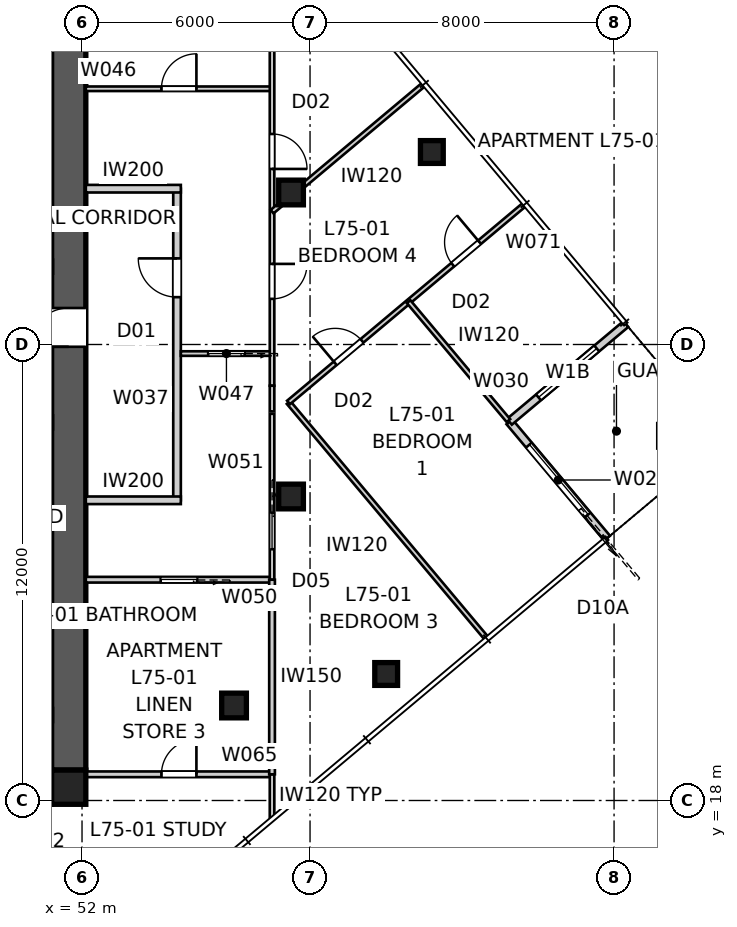
"""IFC4 building model, lengths in metres.
Left out: names, types, materials, properties, quantities, classifications, styles, units other than length and angle.
Written with IfcOpenShell. Run it as: python <this file> out.ifc"""

import sys

from ifc_helpers import new_model, si_unit, direction, frame, frame_2d, origin, origin_2d, place, context, subcontext, project, spatial, polyline, rectangle, outline, extrude, element, fill, save


model = new_model("IFC4")
c1 = context("Model", 3, precision=1e-05, world=origin(), true_north=direction((0.0, 1.0)))
c2 = subcontext(c1, "Body", "Model", "MODEL_VIEW")
j1 = project(units=[si_unit("LENGTHUNIT", "METRE"), si_unit("PLANEANGLEUNIT", "RADIAN")], contexts=[c1])
p1 = place(None, origin())
s1 = spatial("IfcSite", under=j1, at=p1, CompositionType="ELEMENT")
p2 = place(p1, origin())
s2 = spatial("IfcBuilding", under=s1, at=p2, CompositionType="ELEMENT")
p3 = place(p2, frame((0.0, 0.0, 272.6)))
s3 = spatial("IfcBuildingStorey", under=s2, at=p3, CompositionType="ELEMENT", Elevation=272.6)
p4 = place(p3, frame((51.2, 18.35, 0.0), z_axis=(0.0, 0.0, 1.0), x_axis=(-1.0, 0.0, 0.0)))
e1 = element("IfcWall", 1, at=p4, inside=s3, PredefinedType="SHEAR", context=c2, shape_type="SweptSolid", body=[
    extrude(outline(polyline([(0.0, -0.45), (22.4, -0.45), (22.4, -0.025), (22.85, -0.025), (22.85, 0.025), (22.4, 0.025), (22.4, 0.45), (0.0, 0.45), (0.0, 0.025), (-0.45, 0.025), (-0.45, -0.025), (0.0, -0.025), (0.0, -0.45)])), origin(), (0.0, 0.0, 1.0), 3.4),
])
p5 = place(p3, frame((51.65, 18.8, 0.0), z_axis=(0.0, 0.0, 1.0), x_axis=(0.0, 1.0, 0.0)))
e2 = element("IfcWall", 2, at=p5, inside=s3, PredefinedType="SHEAR", context=c2, shape_type="SweptSolid", body=[
    extrude(outline(polyline([(0.0, -0.45), (22.4, -0.45), (22.4, -0.025), (22.85, -0.025), (22.85, 0.025), (22.4, 0.025), (22.4, 0.45), (0.0, 0.45), (0.0, 0.025), (-0.45, 0.025), (-0.45, -0.025), (0.0, -0.025), (0.0, -0.45)])), origin(), (0.0, 0.0, 1.0), 3.4),
])
p6 = place(p5, frame((11.14, 0.0, 0.0)))
e3 = element("IfcOpeningElement", 3, at=p6, cuts=e2, PredefinedType="OPENING", context=c2, shape_type="SweptSolid", body=[
    extrude(rectangle(XDim=1.02, YDim=2.4, at=frame_2d((0.51, 1.2))), frame((0.0, 0.46, 0.0), z_axis=(0.0, -1.0, 0.0), x_axis=(1.0, 0.0, 0.0)), (0.0, 0.0, 1.0), 0.92),
])
p7 = place(p3, frame((51.65, 18.35, 0.0), z_axis=(0.0, 0.0, 1.0), x_axis=(1.0, 0.0, 0.0)))
e4 = element("IfcColumn", 4, at=p7, inside=s3, PredefinedType="COLUMN", context=c2, shape_type="SweptSolid", body=[
    extrude(rectangle(XDim=0.9, YDim=0.9, at=origin_2d()), origin(), (0.0, 0.0, 1.0), 3.4),
])
for number, where, z_axis, x_axis in (
    (5, (60.003, 21.329, -0.15), (0.0, 0.0, 1.0), (1.0, 0.0, 0.0)),
    (6, (61.205, 35.065, -0.15), (0.0, 0.0, 1.0), (1.0, 0.0, 0.0)),
):
    element("IfcColumn", number, at=place(p3, frame(where, z_axis=z_axis, x_axis=x_axis)), inside=s3, PredefinedType="COLUMN", context=c2, shape_type="SweptSolid", body=[
        extrude(rectangle(XDim=0.6, YDim=0.6, at=origin_2d()), origin(), (0.0, 0.0, 1.0), 3.55),
    ])
for number, where, z_axis, x_axis in (
    (7, (57.5, 26.0, 0.0), (0.0, 0.0, 1.0), (1.0, 0.0, 0.0)),
    (8, (57.5, 34.0, 0.0), (0.0, 0.0, 1.0), (1.0, 0.0, 0.0)),
    (9, (56.0, 20.5, 0.0), (0.0, 0.0, 1.0), (1.0, 0.0, 0.0)),
):
    element("IfcColumn", number, at=place(p3, frame(where, z_axis=z_axis, x_axis=x_axis)), inside=s3, PredefinedType="COLUMN", context=c2, shape_type="SweptSolid", body=[
        extrude(rectangle(XDim=0.65, YDim=0.65, at=origin_2d()), origin(), (0.0, 0.0, 1.0), 3.4),
    ])
p8 = place(p3, frame((65.817, 24.902, 0.0), z_axis=(0.0, 0.0, 1.0), x_axis=(-0.642768287094, 0.766060656284, 0.0)))
e10 = element("IfcWall", 10, at=p8, inside=s3, PredefinedType="SOLIDWALL", context=c2, shape_type="SweptSolid", body=[
    extrude(rectangle(XDim=4.0, YDim=0.2, at=frame_2d((2.0, 0.0))), origin(), (0.0, 0.0, 1.0), 3.25),
])
p9 = place(p8, frame((0.8, 0.0, 0.0)))
e11 = element("IfcOpeningElement", 11, at=p9, cuts=e10, PredefinedType="OPENING", context=c2, shape_type="SweptSolid", body=[
    extrude(rectangle(XDim=2.4, YDim=2.1, at=frame_2d((1.2, 1.05))), frame((0.0, 0.11, 0.0), z_axis=(0.0, -1.0, 0.0), x_axis=(1.0, 0.0, 0.0)), (0.0, 0.0, 1.0), 0.22),
])
p10 = place(p3, frame((63.246, 27.966, 0.0), z_axis=(0.0, 0.0, 1.0), x_axis=(0.766035437498, 0.642798342015, 0.0)))
e12 = element("IfcWall", 12, at=p10, inside=s3, PredefinedType="SOLIDWALL", context=c2, shape_type="SweptSolid", body=[
    extrude(rectangle(XDim=4.0, YDim=0.2, at=frame_2d((2.0, 0.0))), origin(), (0.0, 0.0, 1.0), 3.25),
])
p11 = place(p10, frame((1.0, 0.0, 0.45)))
e13 = element("IfcOpeningElement", 13, at=p11, cuts=e12, PredefinedType="OPENING", context=c2, shape_type="SweptSolid", body=[
    extrude(rectangle(XDim=2.0, YDim=1.8, at=frame_2d((1.0, 0.9))), frame((0.0, 0.11, 0.0), z_axis=(0.0, -1.0, 0.0), x_axis=(1.0, 0.0, 0.0)), (0.0, 0.0, 1.0), 0.22),
])
p12 = place(p3, frame((54.5, 25.9, 0.0), z_axis=(0.0, 0.0, 1.0), x_axis=(0.0, 1.0, 0.0)))
e14 = element("IfcWall", 14, at=p12, inside=s3, PredefinedType="PARTITIONING", context=c2, shape_type="SweptSolid", body=[
    extrude(rectangle(XDim=8.2, YDim=0.2, at=frame_2d((4.1, 0.0))), origin(), (0.0, 0.0, 1.0), 3.25),
])
p13 = place(p12, frame((5.346, 0.0, 0.0)))
e15 = element("IfcOpeningElement", 15, at=p13, cuts=e14, PredefinedType="OPENING", context=c2, shape_type="SweptSolid", body=[
    extrude(rectangle(XDim=1.02, YDim=2.34, at=frame_2d((0.51, 1.17))), frame((0.0, 0.11, 0.0), z_axis=(0.0, -1.0, 0.0), x_axis=(1.0, 0.0, 0.0)), (0.0, 0.0, 1.0), 0.22),
])
for number, where, z_axis, x_axis in (
    (16, (52.1, 34.1, 0.0), (0.0, 0.0, 1.0), (1.0, 0.0, 0.0)),
    (17, (52.1, 25.9, 0.0), (0.0, 0.0, 1.0), (1.0, 0.0, 0.0)),
):
    element("IfcWall", number, at=place(p3, frame(where, z_axis=z_axis, x_axis=x_axis)), inside=s3, PredefinedType="PARTITIONING", context=c2, shape_type="SweptSolid", body=[
        extrude(rectangle(XDim=2.5, YDim=0.2, at=frame_2d((1.25, 0.0))), origin(), (0.0, 0.0, 1.0), 3.25),
    ])
p14 = place(p3, frame((52.1, 36.73, 0.0), z_axis=(0.0, 0.0, 1.0), x_axis=(1.0, 0.0, 0.0)))
e18 = element("IfcWall", 18, at=p14, inside=s3, PredefinedType="PARTITIONING", context=c2, shape_type="SweptSolid", body=[
    extrude(rectangle(XDim=4.9, YDim=0.12, at=frame_2d((2.45, 0.0))), origin(), (0.0, 0.0, 1.0), 3.25),
])
p15 = place(p14, frame((1.99, 0.0, 0.0)))
e19 = element("IfcOpeningElement", 19, at=p15, cuts=e18, PredefinedType="OPENING", context=c2, shape_type="SweptSolid", body=[
    extrude(rectangle(XDim=0.92, YDim=2.34, at=frame_2d((0.46, 1.17))), frame((0.0, 0.07, 0.0), z_axis=(0.0, -1.0, 0.0), x_axis=(1.0, 0.0, 0.0)), (0.0, 0.0, 1.0), 0.14),
])
p16 = place(p3, frame((57.0, 29.761, 0.0), z_axis=(0.0, 0.0, 1.0), x_axis=(-1.0, 0.0, 0.0)))
e20 = element("IfcWall", 20, at=p16, inside=s3, PredefinedType="PARTITIONING", context=c2, shape_type="SweptSolid", body=[
    extrude(rectangle(XDim=2.4, YDim=0.12, at=frame_2d((1.2, 0.0))), origin(), (0.0, 0.0, 1.0), 3.25),
])
p17 = place(p16, frame((0.72, 0.0, 0.0)))
e21 = element("IfcOpeningElement", 21, at=p17, cuts=e20, PredefinedType="OPENING", context=c2, shape_type="SweptSolid", body=[
    extrude(rectangle(XDim=0.96, YDim=2.1, at=frame_2d((0.48, 1.05))), frame((0.0, 0.07, 0.0), z_axis=(0.0, -1.0, 0.0), x_axis=(1.0, 0.0, 0.0)), (0.0, 0.0, 1.0), 0.14),
])
p18 = place(p3, frame((57.0, 41.57, 0.0), z_axis=(0.0, 0.0, 1.0), x_axis=(0.0, -1.0, 0.0)))
e22 = element("IfcWall", 22, at=p18, inside=s3, PredefinedType="PARTITIONING", context=c2, shape_type="SweptSolid", body=[
    extrude(rectangle(XDim=12.656, YDim=0.12, at=frame_2d((6.328, 0.0))), origin(), (0.0, 0.0, 1.0), 2.55),
])
p19 = place(p18, frame((9.449, 0.0, 0.0)))
e23 = element("IfcOpeningElement", 23, at=p19, cuts=e22, PredefinedType="OPENING", context=c2, shape_type="SweptSolid", body=[
    extrude(rectangle(XDim=0.92, YDim=2.34, at=frame_2d((0.46, 1.17))), frame((0.0, 0.07, 0.0), z_axis=(0.0, -1.0, 0.0), x_axis=(1.0, 0.0, 0.0)), (0.0, 0.0, 1.0), 0.14),
])
p20 = place(p18, frame((6.031, 0.0, 0.0)))
e24 = element("IfcOpeningElement", 24, at=p20, cuts=e22, PredefinedType="OPENING", context=c2, shape_type="SweptSolid", body=[
    extrude(rectangle(XDim=0.92, YDim=2.34, at=frame_2d((0.46, 1.17))), frame((0.0, 0.07, 0.0), z_axis=(0.0, -1.0, 0.0), x_axis=(1.0, 0.0, 0.0)), (0.0, 0.0, 1.0), 0.14),
])
p21 = place(p3, frame((57.0, 23.81, 0.0), z_axis=(0.0, 0.0, 1.0), x_axis=(-1.0, 0.0, 0.0)))
e25 = element("IfcWall", 25, at=p21, inside=s3, PredefinedType="SOLIDWALL", context=c2, shape_type="SweptSolid", body=[
    extrude(rectangle(XDim=4.9, YDim=0.15, at=frame_2d((2.45, 0.0))), origin(), (0.0, 0.0, 1.0), 3.25),
])
p22 = place(p21, frame((1.97, 0.0, 0.0)))
e26 = element("IfcOpeningElement", 26, at=p22, cuts=e25, PredefinedType="OPENING", context=c2, shape_type="SweptSolid", body=[
    extrude(rectangle(XDim=0.96, YDim=2.1, at=frame_2d((0.48, 1.05))), frame((0.0, 0.085, 0.0), z_axis=(0.0, -1.0, 0.0), x_axis=(1.0, 0.0, 0.0)), (0.0, 0.0, 1.0), 0.17),
])
p23 = place(p3, frame((57.0, 28.176, 0.0), z_axis=(0.0, 0.0, 1.0), x_axis=(0.0, -1.0, 0.0)))
e27 = element("IfcWall", 27, at=p23, inside=s3, PredefinedType="PARTITIONING", context=c2, shape_type="SweptSolid", body=[
    extrude(rectangle(XDim=4.365, YDim=0.12, at=frame_2d((2.183, 0.0))), origin(), (0.0, 0.0, 1.0), 2.55),
])
p24 = place(p23, frame((2.603, 0.0, 0.0)))
e28 = element("IfcOpeningElement", 28, at=p24, cuts=e27, PredefinedType="OPENING", context=c2, shape_type="SweptSolid", body=[
    extrude(rectangle(XDim=0.96, YDim=2.1, at=frame_2d((0.48, 1.05))), frame((0.0, 0.07, 0.0), z_axis=(0.0, -1.0, 0.0), x_axis=(1.0, 0.0, 0.0)), (0.0, 0.0, 1.0), 0.14),
])
p25 = place(p3, frame((51.18, 18.689, 0.0), z_axis=(0.0, 0.0, 1.0), x_axis=(1.0, 0.0, 0.0)))
e29 = element("IfcWall", 29, at=p25, inside=s3, PredefinedType="SOLIDWALL", context=c2, shape_type="SweptSolid", body=[
    extrude(rectangle(XDim=5.82, YDim=0.15, at=frame_2d((2.91, 0.0))), origin(), (0.0, 0.0, 1.0), 3.25),
])
p26 = place(p25, frame((2.91, 0.0, 0.0)))
e30 = element("IfcOpeningElement", 30, at=p26, cuts=e29, PredefinedType="OPENING", context=c2, shape_type="SweptSolid", body=[
    extrude(rectangle(XDim=0.92, YDim=2.1, at=frame_2d((0.46, 1.05))), frame((0.0, 0.085, 0.0), z_axis=(0.0, -1.0, 0.0), x_axis=(1.0, 0.0, 0.0)), (0.0, 0.0, 1.0), 0.17),
])
p27 = place(p3, frame((57.0, 18.689, 0.0), z_axis=(0.0, 0.0, 1.0), x_axis=(0.0, -1.0, 0.0)))
e31 = element("IfcWall", 31, at=p27, inside=s3, PredefinedType="PARTITIONING", context=c2, shape_type="SweptSolid", body=[
    extrude(rectangle(XDim=1.133, YDim=0.12, at=frame_2d((0.567, 0.0))), origin(), (0.0, 0.0, 1.0), 3.25),
])
p28 = place(p3, frame((57.0, 23.81, 0.0), z_axis=(0.0, 0.0, 1.0), x_axis=(0.0, -1.0, 0.0)))
e32 = element("IfcWall", 32, at=p28, inside=s3, PredefinedType="SOLIDWALL", context=c2, shape_type="SweptSolid", body=[
    extrude(rectangle(XDim=5.121, YDim=0.15, at=frame_2d((2.56, 0.0))), origin(), (0.0, 0.0, 1.0), 3.25),
])
p29 = place(p3, frame((62.631, 22.281, 0.0), z_axis=(0.0, 0.0, 1.0), x_axis=(-0.642800378028, 0.766033729027, 0.0)))
e33 = element("IfcWall", 33, at=p29, inside=s3, PredefinedType="PARTITIONING", context=c2, shape_type="SweptSolid", body=[
    extrude(rectangle(XDim=8.085, YDim=0.12, at=frame_2d((4.042, 0.0))), origin(), (0.0, 0.0, 1.0), 3.25),
])
p30 = place(p3, frame((57.434, 28.475, 0.0), z_axis=(0.0, 0.0, 1.0), x_axis=(0.766033729027, 0.642800378028, 0.0)))
e34 = element("IfcWall", 34, at=p30, inside=s3, PredefinedType="PARTITIONING", context=c2, shape_type="SweptSolid", body=[
    extrude(rectangle(XDim=8.085, YDim=0.12, at=frame_2d((4.042, 0.0))), origin(), (0.0, 0.0, 1.0), 3.25),
])
p31 = place(p30, frame((1.603, 0.0, 0.0)))
e35 = element("IfcOpeningElement", 35, at=p31, cuts=e34, PredefinedType="OPENING", context=c2, shape_type="SweptSolid", body=[
    extrude(rectangle(XDim=0.92, YDim=2.34, at=frame_2d((0.46, 1.17))), frame((0.0, 0.07, 0.0), z_axis=(0.0, -1.0, 0.0), x_axis=(1.0, 0.0, 0.0)), (0.0, 0.0, 1.0), 0.14),
])
p32 = place(p30, frame((5.64, 0.0, 0.0)))
e36 = element("IfcOpeningElement", 36, at=p32, cuts=e34, PredefinedType="OPENING", context=c2, shape_type="SweptSolid", body=[
    extrude(rectangle(XDim=0.92, YDim=2.34, at=frame_2d((0.46, 1.17))), frame((0.0, 0.07, 0.0), z_axis=(0.0, -1.0, 0.0), x_axis=(1.0, 0.0, 0.0)), (0.0, 0.0, 1.0), 0.14),
])
p33 = place(p3, frame((60.594, 31.126, 0.0), z_axis=(0.0, 0.0, 1.0), x_axis=(0.642767300664, -0.766061483953, 0.0)))
e37 = element("IfcWall", 37, at=p33, inside=s3, PredefinedType="PARTITIONING", context=c2, shape_type="SweptSolid", body=[
    extrude(rectangle(XDim=4.085, YDim=0.12, at=frame_2d((2.042, 0.0))), origin(), (0.0, 0.0, 1.0), 3.25),
])
p34 = place(p3, frame((57.0, 33.495, 0.0), z_axis=(0.0, 0.0, 1.0), x_axis=(0.76605407051, 0.642776136034, 0.0)))
e38 = element("IfcWall", 38, at=p34, inside=s3, PredefinedType="PARTITIONING", context=c2, shape_type="SweptSolid", body=[
    extrude(rectangle(XDim=5.191, YDim=0.12, at=frame_2d((2.595, 0.0))), origin(), (0.0, 0.0, 1.0), 3.25),
])
p35 = place(p3, frame((57.0, 28.915, 0.0), z_axis=(0.0, 0.0, 1.0), x_axis=(0.0, -1.0, 0.0)))
e39 = element("IfcWall", 39, at=p35, inside=s3, PredefinedType="PARTITIONING", context=c2, shape_type="SweptSolid", body=[
    extrude(rectangle(XDim=0.676, YDim=0.12, at=frame_2d((0.338, 0.0))), origin(), (0.0, 0.0, 1.0), 3.25),
])
p36 = place(p9, origin())
e40 = element("IfcDoor", 40, at=p36, inside=s3, OperationType="SLIDING_TO_LEFT", PredefinedType="DOOR", context=c2, shape_type="SweptSolid", body=[
    extrude(rectangle(XDim=2.4, YDim=2.1, at=frame_2d((1.2, 1.05))), frame((0.0, 0.025, 0.0), z_axis=(0.0, -1.0, 0.0), x_axis=(1.0, 0.0, 0.0)), (0.0, 0.0, 1.0), 0.05),
])
fill(e11, e40)
p37 = place(p11, origin())
e41 = element("IfcWindow", 41, at=p37, inside=s3, PartitioningType="SINGLE_PANEL", PredefinedType="WINDOW", context=c2, shape_type="SweptSolid", body=[
    extrude(rectangle(XDim=2.0, YDim=1.8, at=frame_2d((1.0, 0.9))), frame((0.0, 0.03, 0.0), z_axis=(0.0, -1.0, 0.0), x_axis=(1.0, 0.0, 0.0)), (0.0, 0.0, 1.0), 0.06),
])
fill(e13, e41)
p38 = place(p13, origin())
e42 = element("IfcDoor", 42, at=p38, inside=s3, OperationType="SINGLE_SWING_RIGHT", PredefinedType="DOOR", context=c2, shape_type="SweptSolid", body=[
    extrude(rectangle(XDim=1.02, YDim=2.34, at=frame_2d((0.51, 1.17))), frame((0.0, 0.025, 0.0), z_axis=(0.0, -1.0, 0.0), x_axis=(1.0, 0.0, 0.0)), (0.0, 0.0, 1.0), 0.05),
])
fill(e15, e42)
p39 = place(p15, origin())
e43 = element("IfcDoor", 43, at=p39, inside=s3, OperationType="SINGLE_SWING_RIGHT", PredefinedType="DOOR", context=c2, shape_type="SweptSolid", body=[
    extrude(rectangle(XDim=0.92, YDim=2.34, at=frame_2d((0.46, 1.17))), frame((0.0, 0.025, 0.0), z_axis=(0.0, -1.0, 0.0), x_axis=(1.0, 0.0, 0.0)), (0.0, 0.0, 1.0), 0.05),
])
fill(e19, e43)
p40 = place(p19, origin())
e44 = element("IfcDoor", 44, at=p40, inside=s3, OperationType="SINGLE_SWING_LEFT", PredefinedType="DOOR", context=c2, shape_type="SweptSolid", body=[
    extrude(rectangle(XDim=0.92, YDim=2.34, at=frame_2d((0.46, 1.17))), frame((0.0, 0.025, 0.0), z_axis=(0.0, -1.0, 0.0), x_axis=(1.0, 0.0, 0.0)), (0.0, 0.0, 1.0), 0.05),
])
fill(e23, e44)
p41 = place(p20, origin())
e45 = element("IfcDoor", 45, at=p41, inside=s3, OperationType="SINGLE_SWING_RIGHT", PredefinedType="DOOR", context=c2, shape_type="SweptSolid", body=[
    extrude(rectangle(XDim=0.92, YDim=2.34, at=frame_2d((0.46, 1.17))), frame((0.0, 0.025, 0.0), z_axis=(0.0, -1.0, 0.0), x_axis=(1.0, 0.0, 0.0)), (0.0, 0.0, 1.0), 0.05),
])
fill(e24, e45)
p42 = place(p17, origin())
e46 = element("IfcDoor", 46, at=p42, inside=s3, OperationType="SLIDING_TO_LEFT", PredefinedType="DOOR", context=c2, shape_type="SweptSolid", body=[
    extrude(rectangle(XDim=0.96, YDim=2.1, at=frame_2d((0.48, 1.05))), frame((0.0, 0.025, 0.0), z_axis=(0.0, -1.0, 0.0), x_axis=(1.0, 0.0, 0.0)), (0.0, 0.0, 1.0), 0.05),
])
fill(e21, e46)
p43 = place(p22, origin())
e47 = element("IfcDoor", 47, at=p43, inside=s3, OperationType="SLIDING_TO_LEFT", PredefinedType="DOOR", context=c2, shape_type="SweptSolid", body=[
    extrude(rectangle(XDim=0.96, YDim=2.1, at=frame_2d((0.48, 1.05))), frame((0.0, 0.025, 0.0), z_axis=(0.0, -1.0, 0.0), x_axis=(1.0, 0.0, 0.0)), (0.0, 0.0, 1.0), 0.05),
])
fill(e26, e47)
p44 = place(p24, origin())
e48 = element("IfcDoor", 48, at=p44, inside=s3, OperationType="SLIDING_TO_LEFT", PredefinedType="DOOR", context=c2, shape_type="SweptSolid", body=[
    extrude(rectangle(XDim=0.96, YDim=2.1, at=frame_2d((0.48, 1.05))), frame((0.0, 0.025, 0.0), z_axis=(0.0, -1.0, 0.0), x_axis=(1.0, 0.0, 0.0)), (0.0, 0.0, 1.0), 0.05),
])
fill(e28, e48)
p45 = place(p26, origin())
e49 = element("IfcDoor", 49, at=p45, inside=s3, OperationType="SINGLE_SWING_RIGHT", PredefinedType="DOOR", context=c2, shape_type="SweptSolid", body=[
    extrude(rectangle(XDim=0.92, YDim=2.1, at=frame_2d((0.46, 1.05))), frame((0.0, 0.025, 0.0), z_axis=(0.0, -1.0, 0.0), x_axis=(1.0, 0.0, 0.0)), (0.0, 0.0, 1.0), 0.05),
])
fill(e30, e49)
p46 = place(p31, origin())
e50 = element("IfcDoor", 50, at=p46, inside=s3, OperationType="SINGLE_SWING_LEFT", PredefinedType="DOOR", context=c2, shape_type="SweptSolid", body=[
    extrude(rectangle(XDim=0.92, YDim=2.34, at=frame_2d((0.46, 1.17))), frame((0.0, 0.025, 0.0), z_axis=(0.0, -1.0, 0.0), x_axis=(1.0, 0.0, 0.0)), (0.0, 0.0, 1.0), 0.05),
])
fill(e35, e50)
p47 = place(p32, origin())
e51 = element("IfcDoor", 51, at=p47, inside=s3, OperationType="SINGLE_SWING_RIGHT", PredefinedType="DOOR", context=c2, shape_type="SweptSolid", body=[
    extrude(rectangle(XDim=0.92, YDim=2.34, at=frame_2d((0.46, 1.17))), frame((0.0, 0.025, 0.0), z_axis=(0.0, -1.0, 0.0), x_axis=(1.0, 0.0, 0.0)), (0.0, 0.0, 1.0), 0.05),
])
fill(e36, e51)
p48 = place(p6, origin())
e52 = element("IfcDoor", 52, at=p48, inside=s3, OperationType="SINGLE_SWING_LEFT", PredefinedType="DOOR", context=c2, shape_type="SweptSolid", body=[
    extrude(rectangle(XDim=1.02, YDim=2.4, at=frame_2d((0.51, 1.2))), frame((0.0, 0.025, 0.0), z_axis=(0.0, -1.0, 0.0), x_axis=(1.0, 0.0, 0.0)), (0.0, 0.0, 1.0), 0.05),
])
fill(e3, e52)
save(model, sys.argv[1])
